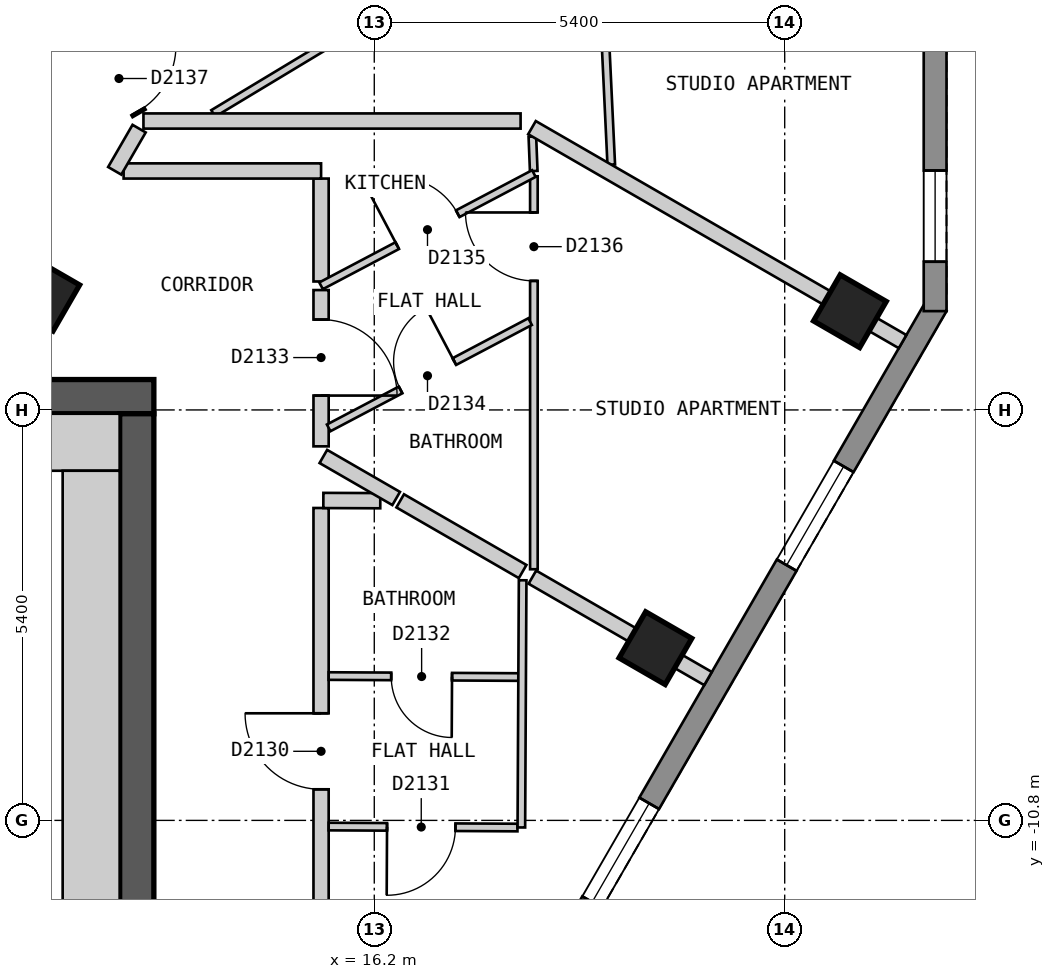
"""IFC4 building model, lengths in metres.
Left out: names, types, materials, properties, quantities, classifications, styles, units other than length and angle.
Written with IfcOpenShell. Run it as: python <this file> out.ifc"""

import sys

from ifc_helpers import new_model, si_unit, direction, frame, frame_2d, origin, origin_2d, place, context, subcontext, project, spatial, polyline, rectangle, outline, extrude, element, fill, save


model = new_model("IFC4")
c1 = context("Model", 3, precision=1e-05, world=origin(), true_north=direction((0.0, 1.0)))
c2 = subcontext(c1, "Body", "Model", "MODEL_VIEW")
j1 = project(units=[si_unit("LENGTHUNIT", "METRE"), si_unit("PLANEANGLEUNIT", "RADIAN")], contexts=[c1])
p1 = place(None, origin())
s1 = spatial("IfcSite", under=j1, at=p1, CompositionType="ELEMENT")
p2 = place(p1, origin())
s2 = spatial("IfcBuilding", under=s1, at=p2, CompositionType="ELEMENT")
p3 = place(p2, frame((0.0, 0.0, 211.8)))
s3 = spatial("IfcBuildingStorey", under=s2, at=p3, CompositionType="ELEMENT", Elevation=211.8)
for number, where, z_axis, x_axis in (
    (1, (19.899, -8.534, 0.0), (0.0, 0.0, 1.0), (0.5, 0.866, 0.0)),
    (2, (22.458, -4.101, 0.0), (0.0, 0.0, 1.0), (0.5, 0.866, 0.0)),
    (3, (11.845, -3.884, 0.0), (0.0, 0.0, 1.0), (0.5, 0.866, 0.0)),
):
    element("IfcColumn", number, at=place(p3, frame(where, z_axis=z_axis, x_axis=x_axis)), inside=s3, PredefinedType="COLUMN", context=c2, shape_type="SweptSolid", body=[
        extrude(rectangle(XDim=0.7, YDim=0.7, at=origin_2d()), origin(), (0.0, 0.0, 1.0), 3.0),
    ])
p4 = place(p3, frame((-13.3, -5.225, 0.0), z_axis=(0.0, 0.0, 1.0), x_axis=(1.0, 0.0, 0.0)))
e4 = element("IfcWall", 4, at=p4, inside=s3, PredefinedType="SHEAR", context=c2, shape_type="SweptSolid", body=[
    extrude(rectangle(XDim=26.6, YDim=0.45, at=frame_2d((13.3, 0.0))), origin(), (0.0, 0.0, 1.0), 2.7),
])
p5 = place(p4, frame((23.65, 0.0, 0.0)))
e5 = element("IfcOpeningElement", 5, at=p5, cuts=e4, PredefinedType="OPENING", context=c2, shape_type="SweptSolid", body=[
    extrude(rectangle(XDim=1.2, YDim=2.1, at=frame_2d((0.6, 1.05))), frame((0.0, 0.235, 0.0), z_axis=(0.0, -1.0, 0.0), x_axis=(1.0, 0.0, 0.0)), (0.0, 0.0, 1.0), 0.47),
])
p6 = place(p3, frame((13.075, -18.55, 0.0), z_axis=(0.0, 0.0, 1.0), x_axis=(0.0, 1.0, 0.0)))
e6 = element("IfcWall", 6, at=p6, inside=s3, PredefinedType="SHEAR", context=c2, shape_type="SweptSolid", body=[
    extrude(rectangle(XDim=13.1, YDim=0.45, at=frame_2d((6.55, 0.0))), origin(), (0.0, 0.0, 1.0), 2.7),
])
p7 = place(p3, frame((15.285, -18.425, 0.0), z_axis=(0.0, 0.0, 1.0), x_axis=(0.500012653391, 0.866018098222, 0.0)))
e7 = element("IfcWall", 7, at=p7, inside=s3, PredefinedType="SOLIDWALL", context=c2, shape_type="SweptSolid", body=[
    extrude(outline(polyline([(0.0, -0.15), (16.628, -0.15), (16.548, 0.15), (0.08, 0.15), (0.0, -0.15)])), origin(), (0.0, 0.0, 1.0), 2.7),
])
p8 = place(p7, frame((2.444, 0.0, 0.15)))
e8 = element("IfcOpeningElement", 8, at=p8, cuts=e7, PredefinedType="OPENING", context=c2, shape_type="SweptSolid", body=[
    extrude(rectangle(XDim=1.5, YDim=2.1, at=frame_2d((0.75, 1.05))), frame((0.0, 0.16, 0.0), z_axis=(0.0, -1.0, 0.0), x_axis=(1.0, 0.0, 0.0)), (0.0, 0.0, 1.0), 0.32),
])
p9 = place(p7, frame((7.564, 0.0, 0.15)))
e9 = element("IfcOpeningElement", 9, at=p9, cuts=e7, PredefinedType="OPENING", context=c2, shape_type="SweptSolid", body=[
    extrude(rectangle(XDim=1.5, YDim=2.1, at=frame_2d((0.75, 1.05))), frame((0.0, 0.16, 0.0), z_axis=(0.0, -1.0, 0.0), x_axis=(1.0, 0.0, 0.0)), (0.0, 0.0, 1.0), 0.32),
])
p10 = place(p7, frame((12.682, 0.0, 0.15)))
e10 = element("IfcOpeningElement", 10, at=p10, cuts=e7, PredefinedType="OPENING", context=c2, shape_type="SweptSolid", body=[
    extrude(rectangle(XDim=1.5, YDim=2.1, at=frame_2d((0.75, 1.05))), frame((0.0, 0.16, 0.0), z_axis=(0.0, -1.0, 0.0), x_axis=(1.0, 0.0, 0.0)), (0.0, 0.0, 1.0), 0.32),
])
p11 = place(p3, frame((23.579, -4.1, 0.0), z_axis=(0.0, 0.0, 1.0), x_axis=(0.0, 1.0, 0.0)))
e11 = element("IfcWall", 11, at=p11, inside=s3, PredefinedType="SOLIDWALL", context=c2, shape_type="SweptSolid", body=[
    extrude(outline(polyline([(0.0, -0.15), (5.0, -0.15), (4.92, 0.15), (0.08, 0.15), (0.0, -0.15)])), origin(), (0.0, 0.0, 1.0), 2.7),
])
p12 = place(p11, frame((0.65, 0.0, 0.15)))
e12 = element("IfcOpeningElement", 12, at=p12, cuts=e11, PredefinedType="OPENING", context=c2, shape_type="SweptSolid", body=[
    extrude(rectangle(XDim=1.2, YDim=2.1, at=frame_2d((0.6, 1.05))), frame((0.0, 0.16, 0.0), z_axis=(0.0, -1.0, 0.0), x_axis=(1.0, 0.0, 0.0)), (0.0, 0.0, 1.0), 0.32),
])
p13 = place(p3, frame((9.238, 5.2, 0.0), z_axis=(0.0, 0.0, 1.0), x_axis=(0.500025705601, -0.86601056214, 0.0)))
e13 = element("IfcWall", 13, at=p13, inside=s3, PredefinedType="PARTITIONING", context=c2, shape_type="SweptSolid", body=[
    extrude(rectangle(XDim=7.735, YDim=0.2, at=frame_2d((3.868, 0.0))), origin(), (0.0, 0.0, 1.0), 2.7),
])
p14 = place(p13, frame((6.705, 0.0, 0.0)))
e14 = element("IfcOpeningElement", 14, at=p14, cuts=e13, PredefinedType="OPENING", context=c2, shape_type="SweptSolid", body=[
    extrude(rectangle(XDim=1.0, YDim=2.1, at=frame_2d((0.5, 1.05))), frame((0.0, 0.11, 0.0), z_axis=(0.0, -1.0, 0.0), x_axis=(1.0, 0.0, 0.0)), (0.0, 0.0, 1.0), 0.22),
])
p15 = place(p13, frame((1.988, 0.0, 0.0)))
e15 = element("IfcOpeningElement", 15, at=p15, cuts=e13, PredefinedType="OPENING", context=c2, shape_type="SweptSolid", body=[
    extrude(rectangle(XDim=1.0, YDim=2.1, at=frame_2d((0.5, 1.05))), frame((0.0, 0.11, 0.0), z_axis=(0.0, -1.0, 0.0), x_axis=(1.0, 0.0, 0.0)), (0.0, 0.0, 1.0), 0.22),
])
p16 = place(p3, frame((15.5, -2.356, 0.0), z_axis=(0.0, 0.0, 1.0), x_axis=(0.0, -1.0, 0.0)))
e16 = element("IfcWall", 16, at=p16, inside=s3, PredefinedType="PARTITIONING", context=c2, shape_type="SweptSolid", body=[
    extrude(rectangle(XDim=1.354, YDim=0.2, at=frame_2d((0.677, 0.0))), origin(), (0.0, 0.0, 1.0), 2.7),
])
p17 = place(p3, frame((12.902, -2.256, 0.0), z_axis=(0.0, 0.0, 1.0), x_axis=(1.0, 0.0, 0.0)))
e17 = element("IfcWall", 17, at=p17, inside=s3, PredefinedType="PARTITIONING", context=c2, shape_type="SweptSolid", body=[
    extrude(rectangle(XDim=2.598, YDim=0.2, at=frame_2d((1.299, 0.0))), origin(), (0.0, 0.0, 1.0), 2.7),
])
p18 = place(p3, frame((12.785, -2.254, 0.0), z_axis=(0.0, 0.0, 1.0), x_axis=(0.500766044352, 0.865582675903, 0.0)))
e18 = element("IfcWall", 18, at=p18, inside=s3, PredefinedType="PARTITIONING", context=c2, shape_type="SweptSolid", body=[
    extrude(rectangle(XDim=0.641, YDim=0.2, at=frame_2d((0.321, 0.0))), origin(), (0.0, 0.0, 1.0), 2.7),
])
p19 = place(p3, frame((15.5, -17.752, 0.0), z_axis=(0.0, 0.0, 1.0), x_axis=(0.0, 1.0, 0.0)))
e19 = element("IfcWall", 19, at=p19, inside=s3, PredefinedType="PARTITIONING", context=c2, shape_type="SweptSolid", body=[
    extrude(rectangle(XDim=11.062, YDim=0.2, at=frame_2d((5.531, 0.0))), origin(), (0.0, 0.0, 1.0), 2.7),
])
p20 = place(p19, frame((7.361, 0.0, 0.0)))
e20 = element("IfcOpeningElement", 20, at=p20, cuts=e19, PredefinedType="OPENING", context=c2, shape_type="SweptSolid", body=[
    extrude(rectangle(XDim=1.0, YDim=2.1, at=frame_2d((0.5, 1.05))), frame((0.0, 0.11, 0.0), z_axis=(0.0, -1.0, 0.0), x_axis=(1.0, 0.0, 0.0)), (0.0, 0.0, 1.0), 0.22),
])
p21 = place(p3, frame((15.5, -5.879, 0.0), z_axis=(0.0, 0.0, 1.0), x_axis=(0.0, 1.0, 0.0)))
e21 = element("IfcWall", 21, at=p21, inside=s3, PredefinedType="PARTITIONING", context=c2, shape_type="SweptSolid", body=[
    extrude(rectangle(XDim=2.056, YDim=0.2, at=frame_2d((1.028, 0.0))), origin(), (0.0, 0.0, 1.0), 2.7),
])
p22 = place(p21, frame((0.668, 0.0, 0.0)))
e22 = element("IfcOpeningElement", 22, at=p22, cuts=e21, PredefinedType="OPENING", context=c2, shape_type="SweptSolid", body=[
    extrude(rectangle(XDim=1.0, YDim=2.1, at=frame_2d((0.5, 1.05))), frame((0.0, 0.11, 0.0), z_axis=(0.0, -1.0, 0.0), x_axis=(1.0, 0.0, 0.0)), (0.0, 0.0, 1.0), 0.22),
])
p23 = place(p3, frame((15.6, -8.901, 0.0), z_axis=(0.0, 0.0, 1.0), x_axis=(0.999986038514, -0.005284200615, 0.0)))
e23 = element("IfcWall", 23, at=p23, inside=s3, PredefinedType="PARTITIONING", context=c2, shape_type="SweptSolid", body=[
    extrude(rectangle(XDim=2.495, YDim=0.1, at=frame_2d((1.248, 0.0))), origin(), (0.0, 0.0, 1.0), 2.7),
])
p24 = place(p23, frame((0.823, 0.0, 0.0)))
e24 = element("IfcOpeningElement", 24, at=p24, cuts=e23, PredefinedType="OPENING", context=c2, shape_type="SweptSolid", body=[
    extrude(rectangle(XDim=0.8, YDim=2.1, at=frame_2d((0.4, 1.05))), frame((0.0, 0.06, 0.0), z_axis=(0.0, -1.0, 0.0), x_axis=(1.0, 0.0, 0.0)), (0.0, 0.0, 1.0), 0.12),
])
p25 = place(p3, frame((15.6, -10.881, 0.0), z_axis=(0.0, 0.0, 1.0), x_axis=(0.999986431575, -0.005209286502, 0.0)))
e25 = element("IfcWall", 25, at=p25, inside=s3, PredefinedType="PARTITIONING", context=c2, shape_type="SweptSolid", body=[
    extrude(rectangle(XDim=2.484, YDim=0.1, at=frame_2d((1.242, 0.0))), origin(), (0.0, 0.0, 1.0), 2.7),
])
p26 = place(p25, frame((0.768, 0.0, 0.0)))
e26 = element("IfcOpeningElement", 26, at=p26, cuts=e25, PredefinedType="OPENING", context=c2, shape_type="SweptSolid", body=[
    extrude(rectangle(XDim=0.9, YDim=2.1, at=frame_2d((0.45, 1.05))), frame((0.0, 0.06, 0.0), z_axis=(0.0, -1.0, 0.0), x_axis=(1.0, 0.0, 0.0)), (0.0, 0.0, 1.0), 0.12),
])
p27 = place(p3, frame((18.28, -1.804, 0.0), z_axis=(0.0, 0.0, 1.0), x_axis=(0.039839036731, -0.999206110446, 0.0)))
e27 = element("IfcWall", 27, at=p27, inside=s3, PredefinedType="PARTITIONING", context=c2, shape_type="SweptSolid", body=[
    extrude(rectangle(XDim=0.453, YDim=0.1, at=frame_2d((0.227, 0.0))), origin(), (0.0, 0.0, 1.0), 2.7),
])
p28 = place(p3, frame((19.151, 1.343, 0.0), z_axis=(0.0, 0.0, 1.0), x_axis=(0.047509130714, -0.998870803707, 0.0)))
e28 = element("IfcWall", 28, at=p28, inside=s3, PredefinedType="PARTITIONING", context=c2, shape_type="SweptSolid", body=[
    extrude(rectangle(XDim=3.52, YDim=0.1, at=frame_2d((1.76, 0.0))), origin(), (0.0, 0.0, 1.0), 2.7),
])
p29 = place(p3, frame((18.135, -10.893, 0.0), z_axis=(0.0, 0.0, 1.0), x_axis=(0.005255182688, 0.999986191432, 0.0)))
e29 = element("IfcWall", 29, at=p29, inside=s3, PredefinedType="PARTITIONING", context=c2, shape_type="SweptSolid", body=[
    extrude(rectangle(XDim=3.252, YDim=0.1, at=frame_2d((1.626, 0.0))), origin(), (0.0, 0.0, 1.0), 2.7),
])
p30 = place(p3, frame((18.3, -7.496, 0.0), z_axis=(0.0, 0.0, 1.0), x_axis=(0.0, 1.0, 0.0)))
e30 = element("IfcWall", 30, at=p30, inside=s3, PredefinedType="PARTITIONING", context=c2, shape_type="SweptSolid", body=[
    extrude(rectangle(XDim=5.17, YDim=0.1, at=frame_2d((2.585, 0.0))), origin(), (0.0, 0.0, 1.0), 2.7),
])
p31 = place(p30, frame((3.794, 0.0, 0.0)))
e31 = element("IfcOpeningElement", 31, at=p31, cuts=e30, PredefinedType="OPENING", context=c2, shape_type="SweptSolid", body=[
    extrude(rectangle(XDim=0.9, YDim=2.1, at=frame_2d((0.45, 1.05))), frame((0.0, 0.06, 0.0), z_axis=(0.0, -1.0, 0.0), x_axis=(1.0, 0.0, 0.0)), (0.0, 0.0, 1.0), 0.12),
])
p32 = place(p3, frame((15.5, -3.767, 0.0), z_axis=(0.0, 0.0, 1.0), x_axis=(0.884482889541, 0.466572628976, 0.0)))
e32 = element("IfcWall", 32, at=p32, inside=s3, PredefinedType="PARTITIONING", context=c2, shape_type="SweptSolid", body=[
    extrude(rectangle(XDim=3.166, YDim=0.1, at=frame_2d((1.583, 0.0))), origin(), (0.0, 0.0, 1.0), 2.7),
])
p33 = place(p32, frame((1.133, 0.0, 0.0)))
e33 = element("IfcOpeningElement", 33, at=p33, cuts=e32, PredefinedType="OPENING", context=c2, shape_type="SweptSolid", body=[
    extrude(rectangle(XDim=0.9, YDim=2.1, at=frame_2d((0.45, 1.05))), frame((0.0, 0.06, 0.0), z_axis=(0.0, -1.0, 0.0), x_axis=(1.0, 0.0, 0.0)), (0.0, 0.0, 1.0), 0.12),
])
p34 = place(p3, frame((15.6, -5.636, 0.0), z_axis=(0.0, 0.0, 1.0), x_axis=(0.884468832747, 0.466599275503, 0.0)))
e34 = element("IfcWall", 34, at=p34, inside=s3, PredefinedType="PARTITIONING", context=c2, shape_type="SweptSolid", body=[
    extrude(rectangle(XDim=2.996, YDim=0.1, at=frame_2d((1.498, 0.0))), origin(), (0.0, 0.0, 1.0), 2.7),
])
p35 = place(p34, frame((1.07, 0.0, 0.0)))
e35 = element("IfcOpeningElement", 35, at=p35, cuts=e34, PredefinedType="OPENING", context=c2, shape_type="SweptSolid", body=[
    extrude(rectangle(XDim=0.8, YDim=2.1, at=frame_2d((0.4, 1.05))), frame((0.0, 0.06, 0.0), z_axis=(0.0, -1.0, 0.0), x_axis=(1.0, 0.0, 0.0)), (0.0, 0.0, 1.0), 0.12),
])
p36 = place(p3, frame((14.081, -1.499, 0.0), z_axis=(0.0, 0.0, 1.0), x_axis=(0.85652273816, 0.516109289798, 0.0)))
e36 = element("IfcWall", 36, at=p36, inside=s3, PredefinedType="PARTITIONING", context=c2, shape_type="SweptSolid", body=[
    extrude(rectangle(XDim=5.537, YDim=0.1, at=frame_2d((2.769, 0.0))), origin(), (0.0, 0.0, 1.0), 2.7),
])
p37 = place(p36, frame((2.267, 0.0, 0.0)))
e37 = element("IfcOpeningElement", 37, at=p37, cuts=e36, PredefinedType="OPENING", context=c2, shape_type="SweptSolid", body=[
    extrude(rectangle(XDim=0.9, YDim=2.1, at=frame_2d((0.45, 1.05))), frame((0.0, 0.06, 0.0), z_axis=(0.0, -1.0, 0.0), x_axis=(1.0, 0.0, 0.0)), (0.0, 0.0, 1.0), 0.12),
])
p38 = place(p3, frame((15.53, -6.591, 0.0), z_axis=(0.0, 0.0, 1.0), x_axis=(0.999992350786, -0.003911312976, 0.0)))
e38 = element("IfcWall", 38, at=p38, inside=s3, PredefinedType="PARTITIONING", context=c2, shape_type="SweptSolid", body=[
    extrude(rectangle(XDim=0.749, YDim=0.2, at=frame_2d((0.375, 0.0))), origin(), (0.0, 0.0, 1.0), 2.7),
])
p39 = place(p3, frame((18.275, -1.686, 0.0), z_axis=(0.0, 0.0, 1.0), x_axis=(0.866041167766, -0.49997269499, 0.0)))
e39 = element("IfcWall", 39, at=p39, inside=s3, PredefinedType="PARTITIONING", context=c2, shape_type="SweptSolid", body=[
    extrude(rectangle(XDim=5.63, YDim=0.2, at=frame_2d((2.815, 0.0))), origin(), (0.0, 0.0, 1.0), 2.7),
])
p40 = place(p3, frame((15.53, -6.012, 0.0), z_axis=(0.0, 0.0, 1.0), x_axis=(0.866075331272, -0.499913513082, 0.0)))
e40 = element("IfcWall", 40, at=p40, inside=s3, PredefinedType="PARTITIONING", context=c2, shape_type="SweptSolid", body=[
    extrude(rectangle(XDim=1.106, YDim=0.2, at=frame_2d((0.553, 0.0))), origin(), (0.0, 0.0, 1.0), 2.7),
])
p41 = place(p3, frame((16.541, -6.596, 0.0), z_axis=(0.0, 0.0, 1.0), x_axis=(0.866078502609, -0.499908018857, 0.0)))
e41 = element("IfcWall", 41, at=p41, inside=s3, PredefinedType="PARTITIONING", context=c2, shape_type="SweptSolid", body=[
    extrude(rectangle(XDim=1.86, YDim=0.2, at=frame_2d((0.93, 0.0))), origin(), (0.0, 0.0, 1.0), 2.7),
])
p42 = place(p3, frame((18.28, -7.6, 0.0), z_axis=(0.0, 0.0, 1.0), x_axis=(0.866072847874, -0.499917815422, 0.0)))
e42 = element("IfcWall", 42, at=p42, inside=s3, PredefinedType="PARTITIONING", context=c2, shape_type="SweptSolid", body=[
    extrude(rectangle(XDim=2.668, YDim=0.2, at=frame_2d((1.334, 0.0))), origin(), (0.0, 0.0, 1.0), 2.7),
])
p43 = place(p3, frame((13.163, -1.599, 0.0), z_axis=(0.0, 0.0, 1.0), x_axis=(1.0, 0.0, 0.0)))
e43 = element("IfcWall", 43, at=p43, inside=s3, PredefinedType="PARTITIONING", context=c2, shape_type="SweptSolid", body=[
    extrude(rectangle(XDim=4.962, YDim=0.2, at=frame_2d((2.481, 0.0))), origin(), (0.0, 0.0, 1.0), 2.7),
])
p44 = place(p3, frame((11.55, -5.825, 0.0), z_axis=(0.0, 0.0, 1.0), x_axis=(1.0, 0.0, 0.0)))
e44 = element("IfcWall", 44, at=p44, inside=s3, PredefinedType="PARTITIONING", context=c2, shape_type="SweptSolid", body=[
    extrude(rectangle(XDim=1.3, YDim=0.75, at=frame_2d((0.65, 0.0))), origin(), (0.0, 0.0, 1.0), 2.7),
])
p45 = place(p3, frame((12.475, -14.45, 0.0), z_axis=(0.0, 0.0, 1.0), x_axis=(0.0, 1.0, 0.0)))
e45 = element("IfcWall", 45, at=p45, inside=s3, PredefinedType="PARTITIONING", context=c2, shape_type="SweptSolid", body=[
    extrude(rectangle(XDim=8.25, YDim=0.75, at=frame_2d((4.125, 0.0))), origin(), (0.0, 0.0, 1.0), 2.7),
])
p46 = place(p9, origin())
e46 = element("IfcWindow", 46, at=p46, inside=s3, PartitioningType="SINGLE_PANEL", PredefinedType="WINDOW", context=c2, shape_type="SweptSolid", body=[
    extrude(rectangle(XDim=1.5, YDim=2.1, at=frame_2d((0.75, 1.05))), frame((0.0, 0.03, 0.0), z_axis=(0.0, -1.0, 0.0), x_axis=(1.0, 0.0, 0.0)), (0.0, 0.0, 1.0), 0.06),
])
fill(e9, e46)
p47 = place(p10, origin())
e47 = element("IfcWindow", 47, at=p47, inside=s3, PartitioningType="SINGLE_PANEL", PredefinedType="WINDOW", context=c2, shape_type="SweptSolid", body=[
    extrude(rectangle(XDim=1.5, YDim=2.1, at=frame_2d((0.75, 1.05))), frame((0.0, 0.03, 0.0), z_axis=(0.0, -1.0, 0.0), x_axis=(1.0, 0.0, 0.0)), (0.0, 0.0, 1.0), 0.06),
])
fill(e10, e47)
p48 = place(p12, origin())
e48 = element("IfcWindow", 48, at=p48, inside=s3, PartitioningType="SINGLE_PANEL", PredefinedType="WINDOW", context=c2, shape_type="SweptSolid", body=[
    extrude(rectangle(XDim=1.2, YDim=2.1, at=frame_2d((0.6, 1.05))), frame((0.0, 0.03, 0.0), z_axis=(0.0, -1.0, 0.0), x_axis=(1.0, 0.0, 0.0)), (0.0, 0.0, 1.0), 0.06),
])
fill(e12, e48)
p49 = place(p20, origin())
e49 = element("IfcDoor", 49, at=p49, inside=s3, OperationType="SINGLE_SWING_RIGHT", PredefinedType="DOOR", context=c2, shape_type="SweptSolid", body=[
    extrude(rectangle(XDim=1.0, YDim=2.1, at=frame_2d((0.5, 1.05))), frame((0.0, 0.025, 0.0), z_axis=(0.0, -1.0, 0.0), x_axis=(1.0, 0.0, 0.0)), (0.0, 0.0, 1.0), 0.05),
])
fill(e20, e49)
p50 = place(p26, origin())
e50 = element("IfcDoor", 50, at=p50, inside=s3, OperationType="SINGLE_SWING_LEFT", PredefinedType="DOOR", context=c2, shape_type="SweptSolid", body=[
    extrude(rectangle(XDim=0.9, YDim=2.1, at=frame_2d((0.45, 1.05))), frame((0.0, 0.025, 0.0), z_axis=(0.0, -1.0, 0.0), x_axis=(1.0, 0.0, 0.0)), (0.0, 0.0, 1.0), 0.05),
])
fill(e26, e50)
p51 = place(p24, origin())
e51 = element("IfcDoor", 51, at=p51, inside=s3, OperationType="SINGLE_SWING_RIGHT", PredefinedType="DOOR", context=c2, shape_type="SweptSolid", body=[
    extrude(rectangle(XDim=0.8, YDim=2.1, at=frame_2d((0.4, 1.05))), frame((0.0, 0.025, 0.0), z_axis=(0.0, -1.0, 0.0), x_axis=(1.0, 0.0, 0.0)), (0.0, 0.0, 1.0), 0.05),
])
fill(e24, e51)
p52 = place(p22, origin())
e52 = element("IfcDoor", 52, at=p52, inside=s3, OperationType="SINGLE_SWING_LEFT", PredefinedType="DOOR", context=c2, shape_type="SweptSolid", body=[
    extrude(rectangle(XDim=1.0, YDim=2.1, at=frame_2d((0.5, 1.05))), frame((0.0, 0.025, 0.0), z_axis=(0.0, -1.0, 0.0), x_axis=(1.0, 0.0, 0.0)), (0.0, 0.0, 1.0), 0.05),
])
fill(e22, e52)
p53 = place(p35, origin())
e53 = element("IfcDoor", 53, at=p53, inside=s3, OperationType="SINGLE_SWING_RIGHT", PredefinedType="DOOR", context=c2, shape_type="SweptSolid", body=[
    extrude(rectangle(XDim=0.8, YDim=2.1, at=frame_2d((0.4, 1.05))), frame((0.0, 0.025, 0.0), z_axis=(0.0, -1.0, 0.0), x_axis=(1.0, 0.0, 0.0)), (0.0, 0.0, 1.0), 0.05),
])
fill(e35, e53)
p54 = place(p33, origin())
e54 = element("IfcDoor", 54, at=p54, inside=s3, OperationType="SINGLE_SWING_LEFT", PredefinedType="DOOR", context=c2, shape_type="SweptSolid", body=[
    extrude(rectangle(XDim=0.9, YDim=2.1, at=frame_2d((0.45, 1.05))), frame((0.0, 0.025, 0.0), z_axis=(0.0, -1.0, 0.0), x_axis=(1.0, 0.0, 0.0)), (0.0, 0.0, 1.0), 0.05),
])
fill(e33, e54)
p55 = place(p31, origin())
e55 = element("IfcDoor", 55, at=p55, inside=s3, OperationType="SINGLE_SWING_RIGHT", PredefinedType="DOOR", context=c2, shape_type="SweptSolid", body=[
    extrude(rectangle(XDim=0.9, YDim=2.1, at=frame_2d((0.45, 1.05))), frame((0.0, 0.025, 0.0), z_axis=(0.0, -1.0, 0.0), x_axis=(1.0, 0.0, 0.0)), (0.0, 0.0, 1.0), 0.05),
])
fill(e31, e55)
p56 = place(p14, origin())
e56 = element("IfcDoor", 56, at=p56, inside=s3, OperationType="SINGLE_SWING_LEFT", PredefinedType="DOOR", context=c2, shape_type="SweptSolid", body=[
    extrude(rectangle(XDim=1.0, YDim=2.1, at=frame_2d((0.5, 1.05))), frame((0.0, 0.025, 0.0), z_axis=(0.0, -1.0, 0.0), x_axis=(1.0, 0.0, 0.0)), (0.0, 0.0, 1.0), 0.05),
])
fill(e14, e56)
save(model, sys.argv[1])
